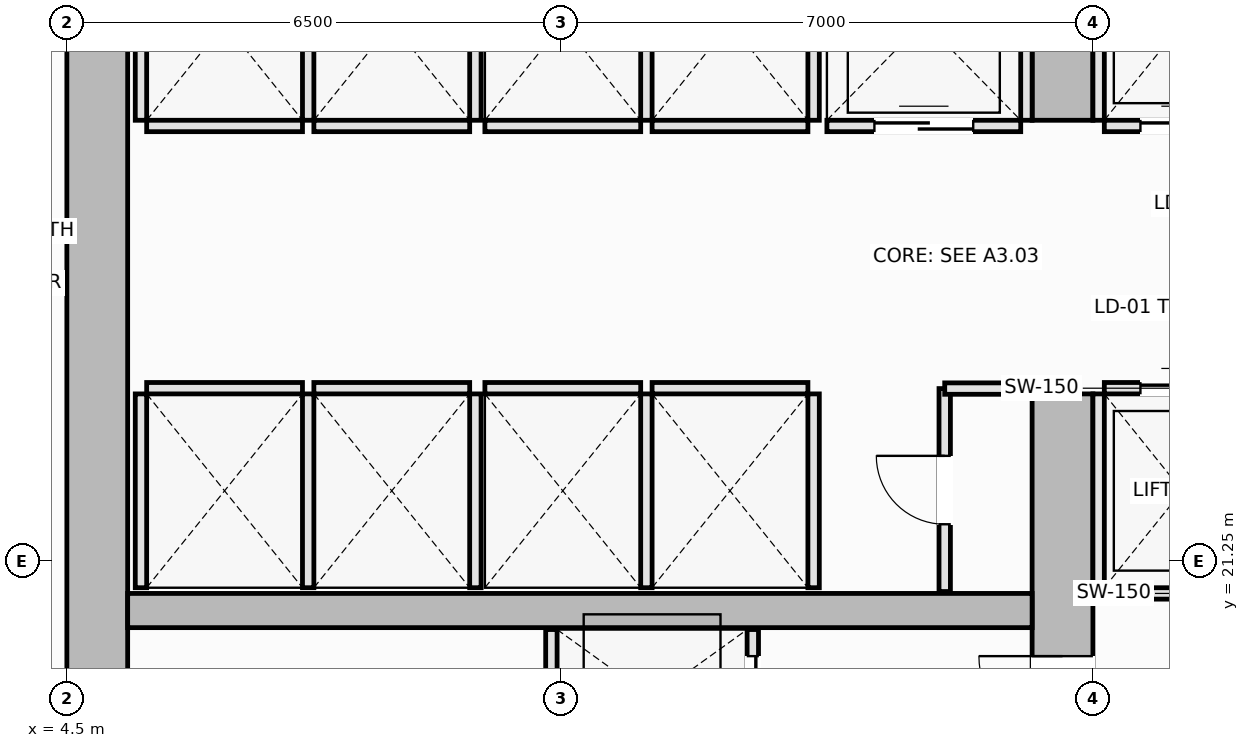
"""IFC4 building model, lengths in metres.
Left out: names, types, materials, properties, quantities, classifications, styles, units other than length and angle.
Written with IfcOpenShell. Run it as: python <this file> out.ifc"""

import sys

from ifc_helpers import new_model, si_unit, direction, frame, frame_2d, origin, place, context, subcontext, project, spatial, rectangle, extrude, element, fill, save


model = new_model("IFC4")
c1 = context("Model", 3, precision=1e-05, world=origin(), true_north=direction((0.0, 1.0)))
c2 = subcontext(c1, "Body", "Model", "MODEL_VIEW")
j1 = project(units=[si_unit("LENGTHUNIT", "METRE"), si_unit("PLANEANGLEUNIT", "RADIAN")], contexts=[c1])
p1 = place(None, origin())
s1 = spatial("IfcSite", under=j1, at=p1, CompositionType="ELEMENT")
p2 = place(p1, origin())
s2 = spatial("IfcBuilding", under=s1, at=p2, CompositionType="ELEMENT")
p3 = place(p2, frame((0.0, 0.0, 10.8)))
s3 = spatial("IfcBuildingStorey", under=s2, at=p3, CompositionType="ELEMENT", Elevation=10.8)
p4 = place(p3, frame((4.9, 14.8, 0.0), z_axis=(0.0, 0.0, 1.0), x_axis=(0.0, 1.0, 0.0)))
e1 = element("IfcWall", 1, at=p4, inside=s3, PredefinedType="SHEAR", context=c2, shape_type="SweptSolid", body=[
    extrude(rectangle(XDim=20.9, YDim=0.8, at=frame_2d((10.45, 0.0))), origin(), (0.0, 0.0, 1.0), 4.8),
])
p5 = place(p3, frame((17.6, 14.8, 0.0), z_axis=(0.0, 0.0, 1.0), x_axis=(0.0, 1.0, 0.0)))
e2 = element("IfcWall", 2, at=p5, inside=s3, PredefinedType="SHEAR", context=c2, shape_type="SweptSolid", body=[
    extrude(rectangle(XDim=8.65, YDim=0.8, at=frame_2d((4.325, 0.0))), origin(), (0.0, 0.0, 1.0), 4.8),
])
p6 = place(p5, frame((4.1, 0.0, 0.0)))
e3 = element("IfcOpeningElement", 3, at=p6, cuts=e2, PredefinedType="OPENING", context=c2, shape_type="SweptSolid", body=[
    extrude(rectangle(XDim=1.1, YDim=2.15, at=frame_2d((0.55, 1.075))), frame((0.0, 0.41, 0.0), z_axis=(0.0, -1.0, 0.0), x_axis=(1.0, 0.0, 0.0)), (0.0, 0.0, 1.0), 0.82),
])
p7 = place(p3, frame((17.6, 27.05, 0.0), z_axis=(0.0, 0.0, 1.0), x_axis=(0.0, 1.0, 0.0)))
e4 = element("IfcWall", 4, at=p7, inside=s3, PredefinedType="SHEAR", context=c2, shape_type="SweptSolid", body=[
    extrude(rectangle(XDim=8.65, YDim=0.8, at=frame_2d((4.325, 0.0))), origin(), (0.0, 0.0, 1.0), 4.8),
])
p8 = place(p7, frame((3.45, 0.0, 0.0)))
e5 = element("IfcOpeningElement", 5, at=p8, cuts=e4, PredefinedType="OPENING", context=c2, shape_type="SweptSolid", body=[
    extrude(rectangle(XDim=1.1, YDim=2.15, at=frame_2d((0.55, 1.075))), frame((0.0, 0.41, 0.0), z_axis=(0.0, -1.0, 0.0), x_axis=(1.0, 0.0, 0.0)), (0.0, 0.0, 1.0), 0.82),
])
p9 = place(p3, frame((5.3, 20.6, 0.0), z_axis=(0.0, 0.0, 1.0), x_axis=(1.0, 0.0, 0.0)))
e6 = element("IfcWall", 6, at=p9, inside=s3, PredefinedType="SHEAR", context=c2, shape_type="SweptSolid", body=[
    extrude(rectangle(XDim=11.9, YDim=0.45, at=frame_2d((5.95, 0.0))), origin(), (0.0, 0.0, 1.0), 4.8),
])
p10 = place(p3, frame((18.15, 20.825, 0.0), z_axis=(0.0, 0.0, 1.0), x_axis=(1.0, 0.0, 0.0)))
e7 = element("IfcWall", 7, at=p10, inside=s3, PredefinedType="PARTITIONING", context=c2, shape_type="SweptSolid", body=[
    extrude(rectangle(XDim=2.05, YDim=0.15, at=frame_2d((1.025, 0.0))), origin(), (0.0, 0.0, 1.0), 4.6),
])
p11 = place(p3, frame((18.15, 23.525, 0.0), z_axis=(0.0, 0.0, 1.0), x_axis=(1.0, 0.0, 0.0)))
e8 = element("IfcWall", 8, at=p11, inside=s3, PredefinedType="PARTITIONING", context=c2, shape_type="SweptSolid", body=[
    extrude(rectangle(XDim=2.05, YDim=0.15, at=frame_2d((1.025, 0.0))), origin(), (0.0, 0.0, 1.0), 4.6),
])
p12 = place(p11, frame((0.475, 0.0, 0.0)))
e9 = element("IfcOpeningElement", 9, at=p12, cuts=e8, PredefinedType="OPENING", context=c2, shape_type="SweptSolid", body=[
    extrude(rectangle(XDim=1.1, YDim=2.2, at=frame_2d((0.55, 1.1))), frame((0.0, 0.085, 0.0), z_axis=(0.0, -1.0, 0.0), x_axis=(1.0, 0.0, 0.0)), (0.0, 0.0, 1.0), 0.17),
])
p13 = place(p3, frame((18.075, 20.9, 0.0), z_axis=(0.0, 0.0, 1.0), x_axis=(0.0, 1.0, 0.0)))
e10 = element("IfcWall", 10, at=p13, inside=s3, PredefinedType="PARTITIONING", context=c2, shape_type="SweptSolid", body=[
    extrude(rectangle(XDim=2.55, YDim=0.15, at=frame_2d((1.275, 0.0))), origin(), (0.0, 0.0, 1.0), 4.6),
])
p14 = place(p3, frame((18.15, 26.975, 0.0), z_axis=(0.0, 0.0, 1.0), x_axis=(1.0, 0.0, 0.0)))
e11 = element("IfcWall", 11, at=p14, inside=s3, PredefinedType="PARTITIONING", context=c2, shape_type="SweptSolid", body=[
    extrude(rectangle(XDim=2.05, YDim=0.15, at=frame_2d((1.025, 0.0))), origin(), (0.0, 0.0, 1.0), 4.6),
])
p15 = place(p14, frame((0.475, 0.0, 0.0)))
e12 = element("IfcOpeningElement", 12, at=p15, cuts=e11, PredefinedType="OPENING", context=c2, shape_type="SweptSolid", body=[
    extrude(rectangle(XDim=1.1, YDim=2.2, at=frame_2d((0.55, 1.1))), frame((0.0, 0.085, 0.0), z_axis=(0.0, -1.0, 0.0), x_axis=(1.0, 0.0, 0.0)), (0.0, 0.0, 1.0), 0.17),
])
p16 = place(p3, frame((18.075, 27.05, 0.0), z_axis=(0.0, 0.0, 1.0), x_axis=(0.0, 1.0, 0.0)))
e13 = element("IfcWall", 13, at=p16, inside=s3, PredefinedType="PARTITIONING", context=c2, shape_type="SweptSolid", body=[
    extrude(rectangle(XDim=2.55, YDim=0.15, at=frame_2d((1.275, 0.0))), origin(), (0.0, 0.0, 1.0), 4.6),
])
p17 = place(p3, frame((5.55, 23.525, 0.0), z_axis=(0.0, 0.0, 1.0), x_axis=(1.0, 0.0, 0.0)))
e14 = element("IfcWall", 14, at=p17, inside=s3, PredefinedType="PARTITIONING", context=c2, shape_type="SweptSolid", body=[
    extrude(rectangle(XDim=2.05, YDim=0.15, at=frame_2d((1.025, 0.0))), origin(), (0.0, 0.0, 1.0), 4.6),
])
for number, where, z_axis, x_axis in (
    (15, (5.475, 20.9, 0.0), (0.0, 0.0, 1.0), (0.0, 1.0, 0.0)),
    (16, (7.675, 20.9, 0.0), (0.0, 0.0, 1.0), (0.0, 1.0, 0.0)),
):
    element("IfcWall", number, at=place(p3, frame(where, z_axis=z_axis, x_axis=x_axis)), inside=s3, PredefinedType="PARTITIONING", context=c2, shape_type="SweptSolid", body=[
        extrude(rectangle(XDim=2.55, YDim=0.15, at=frame_2d((1.275, 0.0))), origin(), (0.0, 0.0, 1.0), 4.6),
    ])
p18 = place(p3, frame((7.75, 23.525, 0.0), z_axis=(0.0, 0.0, 1.0), x_axis=(1.0, 0.0, 0.0)))
e17 = element("IfcWall", 17, at=p18, inside=s3, PredefinedType="PARTITIONING", context=c2, shape_type="SweptSolid", body=[
    extrude(rectangle(XDim=2.05, YDim=0.15, at=frame_2d((1.025, 0.0))), origin(), (0.0, 0.0, 1.0), 4.6),
])
p19 = place(p3, frame((9.875, 20.9, 0.0), z_axis=(0.0, 0.0, 1.0), x_axis=(0.0, 1.0, 0.0)))
e18 = element("IfcWall", 18, at=p19, inside=s3, PredefinedType="PARTITIONING", context=c2, shape_type="SweptSolid", body=[
    extrude(rectangle(XDim=2.55, YDim=0.15, at=frame_2d((1.275, 0.0))), origin(), (0.0, 0.0, 1.0), 4.6),
])
p20 = place(p3, frame((5.55, 26.975, 0.0), z_axis=(0.0, 0.0, 1.0), x_axis=(1.0, 0.0, 0.0)))
e19 = element("IfcWall", 19, at=p20, inside=s3, PredefinedType="PARTITIONING", context=c2, shape_type="SweptSolid", body=[
    extrude(rectangle(XDim=2.05, YDim=0.15, at=frame_2d((1.025, 0.0))), origin(), (0.0, 0.0, 1.0), 4.6),
])
for number, where, z_axis, x_axis in (
    (20, (5.475, 27.05, 0.0), (0.0, 0.0, 1.0), (0.0, 1.0, 0.0)),
    (21, (7.675, 27.05, 0.0), (0.0, 0.0, 1.0), (0.0, 1.0, 0.0)),
):
    element("IfcWall", number, at=place(p3, frame(where, z_axis=z_axis, x_axis=x_axis)), inside=s3, PredefinedType="PARTITIONING", context=c2, shape_type="SweptSolid", body=[
        extrude(rectangle(XDim=2.55, YDim=0.15, at=frame_2d((1.275, 0.0))), origin(), (0.0, 0.0, 1.0), 4.6),
    ])
p21 = place(p3, frame((7.75, 26.975, 0.0), z_axis=(0.0, 0.0, 1.0), x_axis=(1.0, 0.0, 0.0)))
e22 = element("IfcWall", 22, at=p21, inside=s3, PredefinedType="PARTITIONING", context=c2, shape_type="SweptSolid", body=[
    extrude(rectangle(XDim=2.05, YDim=0.15, at=frame_2d((1.025, 0.0))), origin(), (0.0, 0.0, 1.0), 4.6),
])
p22 = place(p3, frame((9.875, 27.05, 0.0), z_axis=(0.0, 0.0, 1.0), x_axis=(0.0, 1.0, 0.0)))
e23 = element("IfcWall", 23, at=p22, inside=s3, PredefinedType="PARTITIONING", context=c2, shape_type="SweptSolid", body=[
    extrude(rectangle(XDim=2.55, YDim=0.15, at=frame_2d((1.275, 0.0))), origin(), (0.0, 0.0, 1.0), 4.6),
])
p23 = place(p3, frame((10.0, 23.525, 0.0), z_axis=(0.0, 0.0, 1.0), x_axis=(1.0, 0.0, 0.0)))
e24 = element("IfcWall", 24, at=p23, inside=s3, PredefinedType="PARTITIONING", context=c2, shape_type="SweptSolid", body=[
    extrude(rectangle(XDim=2.05, YDim=0.15, at=frame_2d((1.025, 0.0))), origin(), (0.0, 0.0, 1.0), 4.6),
])
p24 = place(p3, frame((12.125, 20.9, 0.0), z_axis=(0.0, 0.0, 1.0), x_axis=(0.0, 1.0, 0.0)))
e25 = element("IfcWall", 25, at=p24, inside=s3, PredefinedType="PARTITIONING", context=c2, shape_type="SweptSolid", body=[
    extrude(rectangle(XDim=2.55, YDim=0.15, at=frame_2d((1.275, 0.0))), origin(), (0.0, 0.0, 1.0), 4.6),
])
p25 = place(p3, frame((12.2, 23.525, 0.0), z_axis=(0.0, 0.0, 1.0), x_axis=(1.0, 0.0, 0.0)))
e26 = element("IfcWall", 26, at=p25, inside=s3, PredefinedType="PARTITIONING", context=c2, shape_type="SweptSolid", body=[
    extrude(rectangle(XDim=2.05, YDim=0.15, at=frame_2d((1.025, 0.0))), origin(), (0.0, 0.0, 1.0), 4.6),
])
p26 = place(p3, frame((14.325, 20.9, 0.0), z_axis=(0.0, 0.0, 1.0), x_axis=(0.0, 1.0, 0.0)))
e27 = element("IfcWall", 27, at=p26, inside=s3, PredefinedType="PARTITIONING", context=c2, shape_type="SweptSolid", body=[
    extrude(rectangle(XDim=2.55, YDim=0.15, at=frame_2d((1.275, 0.0))), origin(), (0.0, 0.0, 1.0), 4.6),
])
p27 = place(p3, frame((10.0, 26.975, 0.0), z_axis=(0.0, 0.0, 1.0), x_axis=(1.0, 0.0, 0.0)))
e28 = element("IfcWall", 28, at=p27, inside=s3, PredefinedType="PARTITIONING", context=c2, shape_type="SweptSolid", body=[
    extrude(rectangle(XDim=2.05, YDim=0.15, at=frame_2d((1.025, 0.0))), origin(), (0.0, 0.0, 1.0), 4.6),
])
p28 = place(p3, frame((12.125, 27.05, 0.0), z_axis=(0.0, 0.0, 1.0), x_axis=(0.0, 1.0, 0.0)))
e29 = element("IfcWall", 29, at=p28, inside=s3, PredefinedType="PARTITIONING", context=c2, shape_type="SweptSolid", body=[
    extrude(rectangle(XDim=2.55, YDim=0.15, at=frame_2d((1.275, 0.0))), origin(), (0.0, 0.0, 1.0), 4.6),
])
p29 = place(p3, frame((12.2, 26.975, 0.0), z_axis=(0.0, 0.0, 1.0), x_axis=(1.0, 0.0, 0.0)))
e30 = element("IfcWall", 30, at=p29, inside=s3, PredefinedType="PARTITIONING", context=c2, shape_type="SweptSolid", body=[
    extrude(rectangle(XDim=2.05, YDim=0.15, at=frame_2d((1.025, 0.0))), origin(), (0.0, 0.0, 1.0), 4.6),
])
p30 = place(p3, frame((14.325, 27.05, 0.0), z_axis=(0.0, 0.0, 1.0), x_axis=(0.0, 1.0, 0.0)))
e31 = element("IfcWall", 31, at=p30, inside=s3, PredefinedType="PARTITIONING", context=c2, shape_type="SweptSolid", body=[
    extrude(rectangle(XDim=2.55, YDim=0.15, at=frame_2d((1.275, 0.0))), origin(), (0.0, 0.0, 1.0), 4.6),
])
p31 = place(p3, frame((14.5, 26.975, 0.0), z_axis=(0.0, 0.0, 1.0), x_axis=(1.0, 0.0, 0.0)))
e32 = element("IfcWall", 32, at=p31, inside=s3, PredefinedType="PARTITIONING", context=c2, shape_type="SweptSolid", body=[
    extrude(rectangle(XDim=2.55, YDim=0.15, at=frame_2d((1.275, 0.0))), origin(), (0.0, 0.0, 1.0), 4.6),
])
p32 = place(p31, frame((0.625, 0.0, 0.0)))
e33 = element("IfcOpeningElement", 33, at=p32, cuts=e32, PredefinedType="OPENING", context=c2, shape_type="SweptSolid", body=[
    extrude(rectangle(XDim=1.3, YDim=2.2, at=frame_2d((0.65, 1.1))), frame((0.0, 0.085, 0.0), z_axis=(0.0, -1.0, 0.0), x_axis=(1.0, 0.0, 0.0)), (0.0, 0.0, 1.0), 0.17),
])
p33 = place(p3, frame((17.125, 27.05, 0.0), z_axis=(0.0, 0.0, 1.0), x_axis=(0.0, 1.0, 0.0)))
e34 = element("IfcWall", 34, at=p33, inside=s3, PredefinedType="PARTITIONING", context=c2, shape_type="SweptSolid", body=[
    extrude(rectangle(XDim=2.6, YDim=0.15, at=frame_2d((1.3, 0.0))), origin(), (0.0, 0.0, 1.0), 4.6),
])
p34 = place(p3, frame((10.875, 18.55, 0.0), z_axis=(0.0, 0.0, 1.0), x_axis=(0.0, 1.0, 0.0)))
e35 = element("IfcWall", 35, at=p34, inside=s3, PredefinedType="PARTITIONING", context=c2, shape_type="SweptSolid", body=[
    extrude(rectangle(XDim=1.8, YDim=0.15, at=frame_2d((0.9, 0.0))), origin(), (0.0, 0.0, 1.0), 4.6),
])
p35 = place(p3, frame((13.525, 18.55, 0.0), z_axis=(0.0, 0.0, 1.0), x_axis=(0.0, 1.0, 0.0)))
e36 = element("IfcWall", 36, at=p35, inside=s3, PredefinedType="PARTITIONING", context=c2, shape_type="SweptSolid", body=[
    extrude(rectangle(XDim=1.8, YDim=0.15, at=frame_2d((0.9, 0.0))), origin(), (0.0, 0.0, 1.0), 4.6),
])
p36 = place(p35, frame((0.35, 0.0, 0.0)))
e37 = element("IfcOpeningElement", 37, at=p36, cuts=e36, PredefinedType="OPENING", context=c2, shape_type="SweptSolid", body=[
    extrude(rectangle(XDim=1.1, YDim=2.2, at=frame_2d((0.55, 1.1))), frame((0.0, 0.085, 0.0), z_axis=(0.0, -1.0, 0.0), x_axis=(1.0, 0.0, 0.0)), (0.0, 0.0, 1.0), 0.17),
])
p37 = place(p3, frame((16.05, 20.85, 0.0), z_axis=(0.0, 0.0, 1.0), x_axis=(0.0, 1.0, 0.0)))
e38 = element("IfcWall", 38, at=p37, inside=s3, PredefinedType="PARTITIONING", context=c2, shape_type="SweptSolid", body=[
    extrude(rectangle(XDim=2.67, YDim=0.15, at=frame_2d((1.335, 0.0))), origin(), (0.0, 0.0, 1.0), 4.6),
])
p38 = place(p37, frame((0.885, 0.0, 0.0)))
e39 = element("IfcOpeningElement", 39, at=p38, cuts=e38, PredefinedType="OPENING", context=c2, shape_type="SweptSolid", body=[
    extrude(rectangle(XDim=0.9, YDim=2.1, at=frame_2d((0.45, 1.05))), frame((0.0, 0.085, 0.0), z_axis=(0.0, -1.0, 0.0), x_axis=(1.0, 0.0, 0.0)), (0.0, 0.0, 1.0), 0.17),
])
p39 = place(p3, frame((16.05, 23.52, 0.0), z_axis=(0.0, 0.0, 1.0), x_axis=(1.0, 0.0, 0.0)))
e40 = element("IfcWall", 40, at=p39, inside=s3, PredefinedType="PARTITIONING", context=c2, shape_type="SweptSolid", body=[
    extrude(rectangle(XDim=1.17, YDim=0.15, at=frame_2d((0.585, 0.0))), origin(), (0.0, 0.0, 1.0), 4.6),
])
p40 = place(p12, origin())
e41 = element("IfcDoor", 41, at=p40, inside=s3, OperationType="DOUBLE_DOOR_SLIDING", PredefinedType="DOOR", context=c2, shape_type="SweptSolid", body=[
    extrude(rectangle(XDim=1.1, YDim=2.2, at=frame_2d((0.55, 1.1))), frame((0.0, 0.025, 0.0), z_axis=(0.0, -1.0, 0.0), x_axis=(1.0, 0.0, 0.0)), (0.0, 0.0, 1.0), 0.05),
])
fill(e9, e41)
p41 = place(p15, origin())
e42 = element("IfcDoor", 42, at=p41, inside=s3, OperationType="DOUBLE_DOOR_SLIDING", PredefinedType="DOOR", context=c2, shape_type="SweptSolid", body=[
    extrude(rectangle(XDim=1.1, YDim=2.2, at=frame_2d((0.55, 1.1))), frame((0.0, 0.025, 0.0), z_axis=(0.0, -1.0, 0.0), x_axis=(1.0, 0.0, 0.0)), (0.0, 0.0, 1.0), 0.05),
])
fill(e12, e42)
p42 = place(p32, origin())
e43 = element("IfcDoor", 43, at=p42, inside=s3, OperationType="DOUBLE_DOOR_SLIDING", PredefinedType="DOOR", context=c2, shape_type="SweptSolid", body=[
    extrude(rectangle(XDim=1.3, YDim=2.2, at=frame_2d((0.65, 1.1))), frame((0.0, 0.025, 0.0), z_axis=(0.0, -1.0, 0.0), x_axis=(1.0, 0.0, 0.0)), (0.0, 0.0, 1.0), 0.05),
])
fill(e33, e43)
p43 = place(p36, origin())
e44 = element("IfcDoor", 44, at=p43, inside=s3, OperationType="DOUBLE_DOOR_SLIDING", PredefinedType="DOOR", context=c2, shape_type="SweptSolid", body=[
    extrude(rectangle(XDim=1.1, YDim=2.2, at=frame_2d((0.55, 1.1))), frame((0.0, 0.025, 0.0), z_axis=(0.0, -1.0, 0.0), x_axis=(1.0, 0.0, 0.0)), (0.0, 0.0, 1.0), 0.05),
])
fill(e37, e44)
p44 = place(p6, origin())
e45 = element("IfcDoor", 45, at=p44, inside=s3, OperationType="SINGLE_SWING_RIGHT", PredefinedType="DOOR", context=c2, shape_type="SweptSolid", body=[
    extrude(rectangle(XDim=1.1, YDim=2.15, at=frame_2d((0.55, 1.075))), frame((0.0, 0.025, 0.0), z_axis=(0.0, -1.0, 0.0), x_axis=(1.0, 0.0, 0.0)), (0.0, 0.0, 1.0), 0.05),
])
fill(e3, e45)
p45 = place(p38, origin())
e46 = element("IfcDoor", 46, at=p45, inside=s3, OperationType="SINGLE_SWING_RIGHT", PredefinedType="DOOR", context=c2, shape_type="SweptSolid", body=[
    extrude(rectangle(XDim=0.9, YDim=2.1, at=frame_2d((0.45, 1.05))), frame((0.0, 0.025, 0.0), z_axis=(0.0, -1.0, 0.0), x_axis=(1.0, 0.0, 0.0)), (0.0, 0.0, 1.0), 0.05),
])
fill(e39, e46)
save(model, sys.argv[1])
